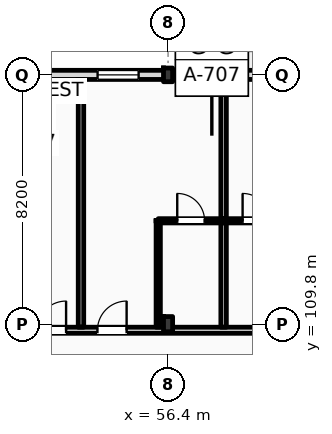
"""IFC4 building model, lengths in metres.
Left out: names, types, materials, properties, quantities, classifications, styles, units other than length and angle.
Written with IfcOpenShell. Run it as: python <this file> out.ifc"""

import sys

from ifc_helpers import new_model, si_unit, direction, frame, frame_2d, origin, origin_2d, place, context, subcontext, project, spatial, rectangle, i_section, extrude, element, fill, save


model = new_model("IFC4")
c1 = context("Model", 3, precision=1e-05, world=origin(), true_north=direction((0.0, 1.0)))
c2 = subcontext(c1, "Body", "Model", "MODEL_VIEW")
j1 = project(units=[si_unit("LENGTHUNIT", "METRE"), si_unit("PLANEANGLEUNIT", "RADIAN")], contexts=[c1])
p1 = place(None, origin())
s1 = spatial("IfcSite", under=j1, at=p1, CompositionType="ELEMENT")
p2 = place(p1, origin())
s2 = spatial("IfcBuilding", under=s1, at=p2, CompositionType="ELEMENT")
p3 = place(p2, frame((0.0, 0.0, 28.2)))
s3 = spatial("IfcBuildingStorey", under=s2, at=p3, CompositionType="ELEMENT", Elevation=28.2)
p4 = place(p3, frame((56.4, 109.8, 0.0), z_axis=(0.0, 0.0, 1.0), x_axis=(1.0, 0.0, 0.0)))
e1 = element("IfcColumn", 1, at=p4, inside=s3, PredefinedType="COLUMN", context=c2, shape_type="SweptSolid", body=[
    extrude(i_section(OverallWidth=0.3, OverallDepth=0.5, WebThickness=0.014, FlangeThickness=0.028, FilletRadius=0.027, at=origin_2d()), origin(), (0.0, 0.0, 1.0), 3.6),
])
p5 = place(p3, frame((56.4, 118.0, 0.0), z_axis=(0.0, 0.0, 1.0), x_axis=(1.0, 0.0, 0.0)))
e2 = element("IfcColumn", 2, at=p5, inside=s3, PredefinedType="COLUMN", context=c2, shape_type="SweptSolid", body=[
    extrude(i_section(OverallWidth=0.3, OverallDepth=0.45, WebThickness=0.014, FlangeThickness=0.026, FilletRadius=0.027, at=origin_2d()), origin(), (0.0, 0.0, 1.0), 3.6),
])
p6 = place(p3, frame((22.5, 118.0, 0.0), z_axis=(0.0, 0.0, 1.0), x_axis=(1.0, 0.0, 0.0)))
e3 = element("IfcWall", 3, at=p6, inside=s3, PredefinedType="STANDARD", context=c2, shape_type="SweptSolid", body=[
    extrude(rectangle(XDim=97.5, YDim=0.3, at=frame_2d((48.75, 0.0))), origin(), (0.0, 0.0, 1.0), 2.8),
])
p7 = place(p6, frame((0.91, 0.0, 0.9)))
e4 = element("IfcOpeningElement", 4, at=p7, cuts=e3, PredefinedType="OPENING", context=c2, shape_type="SweptSolid", body=[
    extrude(rectangle(XDim=0.9, YDim=1.72, at=frame_2d((0.45, 0.86))), frame((0.0, 0.16, 0.0), z_axis=(0.0, -1.0, 0.0), x_axis=(1.0, 0.0, 0.0)), (0.0, 0.0, 1.0), 0.32),
])
p8 = place(p6, frame((6.561, 0.0, 0.0)))
e5 = element("IfcOpeningElement", 5, at=p8, cuts=e3, PredefinedType="OPENING", context=c2, shape_type="SweptSolid", body=[
    extrude(rectangle(XDim=1.2, YDim=2.25, at=frame_2d((0.6, 1.125))), frame((0.0, 0.16, 0.0), z_axis=(0.0, -1.0, 0.0), x_axis=(1.0, 0.0, 0.0)), (0.0, 0.0, 1.0), 0.32),
])
p9 = place(p6, frame((11.477, 0.0, 0.9)))
e6 = element("IfcOpeningElement", 6, at=p9, cuts=e3, PredefinedType="OPENING", context=c2, shape_type="SweptSolid", body=[
    extrude(rectangle(XDim=1.1, YDim=1.5, at=frame_2d((0.55, 0.75))), frame((0.0, 0.16, 0.0), z_axis=(0.0, -1.0, 0.0), x_axis=(1.0, 0.0, 0.0)), (0.0, 0.0, 1.0), 0.32),
])
p10 = place(p6, frame((15.194, 0.0, 0.9)))
e7 = element("IfcOpeningElement", 7, at=p10, cuts=e3, PredefinedType="OPENING", context=c2, shape_type="SweptSolid", body=[
    extrude(rectangle(XDim=1.25, YDim=1.6, at=frame_2d((0.625, 0.8))), frame((0.0, 0.16, 0.0), z_axis=(0.0, -1.0, 0.0), x_axis=(1.0, 0.0, 0.0)), (0.0, 0.0, 1.0), 0.32),
])
p11 = place(p6, frame((19.509, 0.0, 0.9)))
e8 = element("IfcOpeningElement", 8, at=p11, cuts=e3, PredefinedType="OPENING", context=c2, shape_type="SweptSolid", body=[
    extrude(rectangle(XDim=1.4, YDim=1.7, at=frame_2d((0.7, 0.85))), frame((0.0, 0.16, 0.0), z_axis=(0.0, -1.0, 0.0), x_axis=(1.0, 0.0, 0.0)), (0.0, 0.0, 1.0), 0.32),
])
p12 = place(p6, frame((23.258, 0.0, 0.0)))
e9 = element("IfcOpeningElement", 9, at=p12, cuts=e3, PredefinedType="OPENING", context=c2, shape_type="SweptSolid", body=[
    extrude(rectangle(XDim=1.2, YDim=2.25, at=frame_2d((0.6, 1.125))), frame((0.0, 0.16, 0.0), z_axis=(0.0, -1.0, 0.0), x_axis=(1.0, 0.0, 0.0)), (0.0, 0.0, 1.0), 0.32),
])
p13 = place(p6, frame((28.115, 0.0, 0.9)))
e10 = element("IfcOpeningElement", 10, at=p13, cuts=e3, PredefinedType="OPENING", context=c2, shape_type="SweptSolid", body=[
    extrude(rectangle(XDim=1.75, YDim=1.72, at=frame_2d((0.875, 0.86))), frame((0.0, 0.16, 0.0), z_axis=(0.0, -1.0, 0.0), x_axis=(1.0, 0.0, 0.0)), (0.0, 0.0, 1.0), 0.32),
])
p14 = place(p6, frame((31.582, 0.0, 0.9)))
e11 = element("IfcOpeningElement", 11, at=p14, cuts=e3, PredefinedType="OPENING", context=c2, shape_type="SweptSolid", body=[
    extrude(rectangle(XDim=1.35, YDim=1.72, at=frame_2d((0.675, 0.86))), frame((0.0, 0.16, 0.0), z_axis=(0.0, -1.0, 0.0), x_axis=(1.0, 0.0, 0.0)), (0.0, 0.0, 1.0), 0.32),
])
p15 = place(p6, frame((37.379, 0.0, 0.0)))
e12 = element("IfcOpeningElement", 12, at=p15, cuts=e3, PredefinedType="OPENING", context=c2, shape_type="SweptSolid", body=[
    extrude(rectangle(XDim=1.2, YDim=2.25, at=frame_2d((0.6, 1.125))), frame((0.0, 0.16, 0.0), z_axis=(0.0, -1.0, 0.0), x_axis=(1.0, 0.0, 0.0)), (0.0, 0.0, 1.0), 0.32),
])
p16 = place(p6, frame((42.663, 0.0, 0.9)))
e13 = element("IfcOpeningElement", 13, at=p16, cuts=e3, PredefinedType="OPENING", context=c2, shape_type="SweptSolid", body=[
    extrude(rectangle(XDim=1.35, YDim=1.72, at=frame_2d((0.675, 0.86))), frame((0.0, 0.16, 0.0), z_axis=(0.0, -1.0, 0.0), x_axis=(1.0, 0.0, 0.0)), (0.0, 0.0, 1.0), 0.32),
])
p17 = place(p6, frame((45.119, 0.0, 0.9)))
e14 = element("IfcOpeningElement", 14, at=p17, cuts=e3, PredefinedType="OPENING", context=c2, shape_type="SweptSolid", body=[
    extrude(rectangle(XDim=2.871, YDim=1.72, at=frame_2d((1.436, 0.86))), frame((0.0, 0.16, 0.0), z_axis=(0.0, -1.0, 0.0), x_axis=(1.0, 0.0, 0.0)), (0.0, 0.0, 1.0), 0.32),
])
p18 = place(p6, frame((50.41, 0.0, 0.9)))
e15 = element("IfcOpeningElement", 15, at=p18, cuts=e3, PredefinedType="OPENING", context=c2, shape_type="SweptSolid", body=[
    extrude(rectangle(XDim=1.8, YDim=1.72, at=frame_2d((0.9, 0.86))), frame((0.0, 0.16, 0.0), z_axis=(0.0, -1.0, 0.0), x_axis=(1.0, 0.0, 0.0)), (0.0, 0.0, 1.0), 0.32),
])
p19 = place(p6, frame((54.375, 0.0, 0.0)))
e16 = element("IfcOpeningElement", 16, at=p19, cuts=e3, PredefinedType="OPENING", context=c2, shape_type="SweptSolid", body=[
    extrude(rectangle(XDim=1.2, YDim=2.25, at=frame_2d((0.6, 1.125))), frame((0.0, 0.16, 0.0), z_axis=(0.0, -1.0, 0.0), x_axis=(1.0, 0.0, 0.0)), (0.0, 0.0, 1.0), 0.32),
])
p20 = place(p6, frame((59.052, 0.0, 0.9)))
e17 = element("IfcOpeningElement", 17, at=p20, cuts=e3, PredefinedType="OPENING", context=c2, shape_type="SweptSolid", body=[
    extrude(rectangle(XDim=1.35, YDim=1.72, at=frame_2d((0.675, 0.86))), frame((0.0, 0.16, 0.0), z_axis=(0.0, -1.0, 0.0), x_axis=(1.0, 0.0, 0.0)), (0.0, 0.0, 1.0), 0.32),
])
p21 = place(p6, frame((62.768, 0.0, 0.9)))
e18 = element("IfcOpeningElement", 18, at=p21, cuts=e3, PredefinedType="OPENING", context=c2, shape_type="SweptSolid", body=[
    extrude(rectangle(XDim=1.5, YDim=1.72, at=frame_2d((0.75, 0.86))), frame((0.0, 0.16, 0.0), z_axis=(0.0, -1.0, 0.0), x_axis=(1.0, 0.0, 0.0)), (0.0, 0.0, 1.0), 0.32),
])
p22 = place(p6, frame((68.498, 0.0, 0.0)))
e19 = element("IfcOpeningElement", 19, at=p22, cuts=e3, PredefinedType="OPENING", context=c2, shape_type="SweptSolid", body=[
    extrude(rectangle(XDim=1.2, YDim=2.25, at=frame_2d((0.6, 1.125))), frame((0.0, 0.16, 0.0), z_axis=(0.0, -1.0, 0.0), x_axis=(1.0, 0.0, 0.0)), (0.0, 0.0, 1.0), 0.32),
])
p23 = place(p6, frame((71.265, 0.0, 0.9)))
e20 = element("IfcOpeningElement", 20, at=p23, cuts=e3, PredefinedType="OPENING", context=c2, shape_type="SweptSolid", body=[
    extrude(rectangle(XDim=0.9, YDim=1.72, at=frame_2d((0.45, 0.86))), frame((0.0, 0.16, 0.0), z_axis=(0.0, -1.0, 0.0), x_axis=(1.0, 0.0, 0.0)), (0.0, 0.0, 1.0), 0.32),
])
p24 = place(p6, frame((76.316, 0.0, 0.9)))
e21 = element("IfcOpeningElement", 21, at=p24, cuts=e3, PredefinedType="OPENING", context=c2, shape_type="SweptSolid", body=[
    extrude(rectangle(XDim=1.95, YDim=1.72, at=frame_2d((0.975, 0.86))), frame((0.0, 0.16, 0.0), z_axis=(0.0, -1.0, 0.0), x_axis=(1.0, 0.0, 0.0)), (0.0, 0.0, 1.0), 0.32),
])
p25 = place(p6, frame((81.632, 0.0, 0.9)))
e22 = element("IfcOpeningElement", 22, at=p25, cuts=e3, PredefinedType="OPENING", context=c2, shape_type="SweptSolid", body=[
    extrude(rectangle(XDim=1.35, YDim=1.72, at=frame_2d((0.675, 0.86))), frame((0.0, 0.16, 0.0), z_axis=(0.0, -1.0, 0.0), x_axis=(1.0, 0.0, 0.0)), (0.0, 0.0, 1.0), 0.32),
])
p26 = place(p6, frame((84.948, 0.0, 0.9)))
e23 = element("IfcOpeningElement", 23, at=p26, cuts=e3, PredefinedType="OPENING", context=c2, shape_type="SweptSolid", body=[
    extrude(rectangle(XDim=2.25, YDim=1.72, at=frame_2d((1.125, 0.86))), frame((0.0, 0.16, 0.0), z_axis=(0.0, -1.0, 0.0), x_axis=(1.0, 0.0, 0.0)), (0.0, 0.0, 1.0), 0.32),
])
p27 = place(p6, frame((90.063, 0.0, 0.9)))
e24 = element("IfcOpeningElement", 24, at=p27, cuts=e3, PredefinedType="OPENING", context=c2, shape_type="SweptSolid", body=[
    extrude(rectangle(XDim=1.8, YDim=1.72, at=frame_2d((0.9, 0.86))), frame((0.0, 0.16, 0.0), z_axis=(0.0, -1.0, 0.0), x_axis=(1.0, 0.0, 0.0)), (0.0, 0.0, 1.0), 0.32),
])
p28 = place(p6, frame((93.529, 0.0, 0.9)))
e25 = element("IfcOpeningElement", 25, at=p28, cuts=e3, PredefinedType="OPENING", context=c2, shape_type="SweptSolid", body=[
    extrude(rectangle(XDim=2.55, YDim=1.72, at=frame_2d((1.275, 0.86))), frame((0.0, 0.16, 0.0), z_axis=(0.0, -1.0, 0.0), x_axis=(1.0, 0.0, 0.0)), (0.0, 0.0, 1.0), 0.32),
])
p29 = place(p3, frame((10.65, 109.6, 0.0), z_axis=(0.0, 0.0, 1.0), x_axis=(1.0, 0.0, 0.0)))
e26 = element("IfcWall", 26, at=p29, inside=s3, PredefinedType="PARTITIONING", context=c2, shape_type="SweptSolid", body=[
    extrude(rectangle(XDim=109.21, YDim=0.2, at=frame_2d((54.605, 0.0))), origin(), (0.0, 0.0, 1.0), 2.8),
])
p30 = place(p29, frame((12.611, 0.0, 0.0)))
e27 = element("IfcOpeningElement", 27, at=p30, cuts=e26, PredefinedType="OPENING", context=c2, shape_type="SweptSolid", body=[
    extrude(rectangle(XDim=1.02, YDim=2.2, at=frame_2d((0.51, 1.1))), frame((0.0, 0.11, 0.0), z_axis=(0.0, -1.0, 0.0), x_axis=(1.0, 0.0, 0.0)), (0.0, 0.0, 1.0), 0.22),
])
p31 = place(p29, frame((19.451, 0.0, 0.0)))
e28 = element("IfcOpeningElement", 28, at=p31, cuts=e26, PredefinedType="OPENING", context=c2, shape_type="SweptSolid", body=[
    extrude(rectangle(XDim=1.02, YDim=2.2, at=frame_2d((0.51, 1.1))), frame((0.0, 0.11, 0.0), z_axis=(0.0, -1.0, 0.0), x_axis=(1.0, 0.0, 0.0)), (0.0, 0.0, 1.0), 0.22),
])
p32 = place(p29, frame((23.842, 0.0, 0.0)))
e29 = element("IfcOpeningElement", 29, at=p32, cuts=e26, PredefinedType="OPENING", context=c2, shape_type="SweptSolid", body=[
    extrude(rectangle(XDim=1.02, YDim=2.2, at=frame_2d((0.51, 1.1))), frame((0.0, 0.11, 0.0), z_axis=(0.0, -1.0, 0.0), x_axis=(1.0, 0.0, 0.0)), (0.0, 0.0, 1.0), 0.22),
])
p33 = place(p29, frame((26.084, 0.0, 0.0)))
e30 = element("IfcOpeningElement", 30, at=p33, cuts=e26, PredefinedType="OPENING", context=c2, shape_type="SweptSolid", body=[
    extrude(rectangle(XDim=1.02, YDim=2.2, at=frame_2d((0.51, 1.1))), frame((0.0, 0.11, 0.0), z_axis=(0.0, -1.0, 0.0), x_axis=(1.0, 0.0, 0.0)), (0.0, 0.0, 1.0), 0.22),
])
p34 = place(p29, frame((32.655, 0.0, 0.0)))
e31 = element("IfcOpeningElement", 31, at=p34, cuts=e26, PredefinedType="OPENING", context=c2, shape_type="SweptSolid", body=[
    extrude(rectangle(XDim=0.96, YDim=2.2, at=frame_2d((0.48, 1.1))), frame((0.0, 0.11, 0.0), z_axis=(0.0, -1.0, 0.0), x_axis=(1.0, 0.0, 0.0)), (0.0, 0.0, 1.0), 0.22),
])
p35 = place(p29, frame((34.895, 0.0, 0.0)))
e32 = element("IfcOpeningElement", 32, at=p35, cuts=e26, PredefinedType="OPENING", context=c2, shape_type="SweptSolid", body=[
    extrude(rectangle(XDim=0.96, YDim=2.2, at=frame_2d((0.48, 1.1))), frame((0.0, 0.11, 0.0), z_axis=(0.0, -1.0, 0.0), x_axis=(1.0, 0.0, 0.0)), (0.0, 0.0, 1.0), 0.22),
])
p36 = place(p29, frame((41.436, 0.0, 0.0)))
e33 = element("IfcOpeningElement", 33, at=p36, cuts=e26, PredefinedType="OPENING", context=c2, shape_type="SweptSolid", body=[
    extrude(rectangle(XDim=0.96, YDim=2.2, at=frame_2d((0.48, 1.1))), frame((0.0, 0.11, 0.0), z_axis=(0.0, -1.0, 0.0), x_axis=(1.0, 0.0, 0.0)), (0.0, 0.0, 1.0), 0.22),
])
p37 = place(p29, frame((43.427, 0.0, 0.0)))
e34 = element("IfcOpeningElement", 34, at=p37, cuts=e26, PredefinedType="OPENING", context=c2, shape_type="SweptSolid", body=[
    extrude(rectangle(XDim=0.96, YDim=2.2, at=frame_2d((0.48, 1.1))), frame((0.0, 0.11, 0.0), z_axis=(0.0, -1.0, 0.0), x_axis=(1.0, 0.0, 0.0)), (0.0, 0.0, 1.0), 0.22),
])
p38 = place(p29, frame((50.218, 0.0, 0.0)))
e35 = element("IfcOpeningElement", 35, at=p38, cuts=e26, PredefinedType="OPENING", context=c2, shape_type="SweptSolid", body=[
    extrude(rectangle(XDim=0.96, YDim=2.2, at=frame_2d((0.48, 1.1))), frame((0.0, 0.11, 0.0), z_axis=(0.0, -1.0, 0.0), x_axis=(1.0, 0.0, 0.0)), (0.0, 0.0, 1.0), 0.22),
])
p39 = place(p29, frame((54.859, 0.0, 0.0)))
e36 = element("IfcOpeningElement", 36, at=p39, cuts=e26, PredefinedType="OPENING", context=c2, shape_type="SweptSolid", body=[
    extrude(rectangle(XDim=0.96, YDim=2.2, at=frame_2d((0.48, 1.1))), frame((0.0, 0.11, 0.0), z_axis=(0.0, -1.0, 0.0), x_axis=(1.0, 0.0, 0.0)), (0.0, 0.0, 1.0), 0.22),
])
p40 = place(p29, frame((59.0, 0.0, 0.0)))
e37 = element("IfcOpeningElement", 37, at=p40, cuts=e26, PredefinedType="OPENING", context=c2, shape_type="SweptSolid", body=[
    extrude(rectangle(XDim=0.96, YDim=2.2, at=frame_2d((0.48, 1.1))), frame((0.0, 0.11, 0.0), z_axis=(0.0, -1.0, 0.0), x_axis=(1.0, 0.0, 0.0)), (0.0, 0.0, 1.0), 0.22),
])
p41 = place(p29, frame((63.39, 0.0, 0.0)))
e38 = element("IfcOpeningElement", 38, at=p41, cuts=e26, PredefinedType="OPENING", context=c2, shape_type="SweptSolid", body=[
    extrude(rectangle(XDim=0.96, YDim=2.2, at=frame_2d((0.48, 1.1))), frame((0.0, 0.11, 0.0), z_axis=(0.0, -1.0, 0.0), x_axis=(1.0, 0.0, 0.0)), (0.0, 0.0, 1.0), 0.22),
])
p42 = place(p29, frame((65.631, 0.0, 0.0)))
e39 = element("IfcOpeningElement", 39, at=p42, cuts=e26, PredefinedType="OPENING", context=c2, shape_type="SweptSolid", body=[
    extrude(rectangle(XDim=0.96, YDim=2.2, at=frame_2d((0.48, 1.1))), frame((0.0, 0.11, 0.0), z_axis=(0.0, -1.0, 0.0), x_axis=(1.0, 0.0, 0.0)), (0.0, 0.0, 1.0), 0.22),
])
p43 = place(p29, frame((72.172, 0.0, 0.0)))
e40 = element("IfcOpeningElement", 40, at=p43, cuts=e26, PredefinedType="OPENING", context=c2, shape_type="SweptSolid", body=[
    extrude(rectangle(XDim=0.96, YDim=2.2, at=frame_2d((0.48, 1.1))), frame((0.0, 0.11, 0.0), z_axis=(0.0, -1.0, 0.0), x_axis=(1.0, 0.0, 0.0)), (0.0, 0.0, 1.0), 0.22),
])
p44 = place(p29, frame((74.413, 0.0, 0.0)))
e41 = element("IfcOpeningElement", 41, at=p44, cuts=e26, PredefinedType="OPENING", context=c2, shape_type="SweptSolid", body=[
    extrude(rectangle(XDim=0.96, YDim=2.2, at=frame_2d((0.48, 1.1))), frame((0.0, 0.11, 0.0), z_axis=(0.0, -1.0, 0.0), x_axis=(1.0, 0.0, 0.0)), (0.0, 0.0, 1.0), 0.22),
])
p45 = place(p29, frame((80.954, 0.0, 0.0)))
e42 = element("IfcOpeningElement", 42, at=p45, cuts=e26, PredefinedType="OPENING", context=c2, shape_type="SweptSolid", body=[
    extrude(rectangle(XDim=0.96, YDim=2.2, at=frame_2d((0.48, 1.1))), frame((0.0, 0.11, 0.0), z_axis=(0.0, -1.0, 0.0), x_axis=(1.0, 0.0, 0.0)), (0.0, 0.0, 1.0), 0.22),
])
p46 = place(p29, frame((83.195, 0.0, 0.0)))
e43 = element("IfcOpeningElement", 43, at=p46, cuts=e26, PredefinedType="OPENING", context=c2, shape_type="SweptSolid", body=[
    extrude(rectangle(XDim=0.96, YDim=2.2, at=frame_2d((0.48, 1.1))), frame((0.0, 0.11, 0.0), z_axis=(0.0, -1.0, 0.0), x_axis=(1.0, 0.0, 0.0)), (0.0, 0.0, 1.0), 0.22),
])
p47 = place(p29, frame((89.735, 0.0, 0.0)))
e44 = element("IfcOpeningElement", 44, at=p47, cuts=e26, PredefinedType="OPENING", context=c2, shape_type="SweptSolid", body=[
    extrude(rectangle(XDim=0.96, YDim=2.2, at=frame_2d((0.48, 1.1))), frame((0.0, 0.11, 0.0), z_axis=(0.0, -1.0, 0.0), x_axis=(1.0, 0.0, 0.0)), (0.0, 0.0, 1.0), 0.22),
])
p48 = place(p29, frame((94.126, 0.0, 0.0)))
e45 = element("IfcOpeningElement", 45, at=p48, cuts=e26, PredefinedType="OPENING", context=c2, shape_type="SweptSolid", body=[
    extrude(rectangle(XDim=0.96, YDim=2.2, at=frame_2d((0.48, 1.1))), frame((0.0, 0.11, 0.0), z_axis=(0.0, -1.0, 0.0), x_axis=(1.0, 0.0, 0.0)), (0.0, 0.0, 1.0), 0.22),
])
p49 = place(p29, frame((98.517, 0.0, 0.0)))
e46 = element("IfcOpeningElement", 46, at=p49, cuts=e26, PredefinedType="OPENING", context=c2, shape_type="SweptSolid", body=[
    extrude(rectangle(XDim=0.96, YDim=2.2, at=frame_2d((0.48, 1.1))), frame((0.0, 0.11, 0.0), z_axis=(0.0, -1.0, 0.0), x_axis=(1.0, 0.0, 0.0)), (0.0, 0.0, 1.0), 0.22),
])
p50 = place(p29, frame((102.908, 0.0, 0.0)))
e47 = element("IfcOpeningElement", 47, at=p50, cuts=e26, PredefinedType="OPENING", context=c2, shape_type="SweptSolid", body=[
    extrude(rectangle(XDim=0.96, YDim=2.2, at=frame_2d((0.48, 1.1))), frame((0.0, 0.11, 0.0), z_axis=(0.0, -1.0, 0.0), x_axis=(1.0, 0.0, 0.0)), (0.0, 0.0, 1.0), 0.22),
])
p51 = place(p29, frame((105.099, 0.0, 0.0)))
e48 = element("IfcOpeningElement", 48, at=p51, cuts=e26, PredefinedType="OPENING", context=c2, shape_type="SweptSolid", body=[
    extrude(rectangle(XDim=0.96, YDim=2.2, at=frame_2d((0.48, 1.1))), frame((0.0, 0.11, 0.0), z_axis=(0.0, -1.0, 0.0), x_axis=(1.0, 0.0, 0.0)), (0.0, 0.0, 1.0), 0.22),
])
p52 = place(p29, frame((2.716, 0.0, 0.0)))
e49 = element("IfcOpeningElement", 49, at=p52, cuts=e26, PredefinedType="OPENING", context=c2, shape_type="SweptSolid", body=[
    extrude(rectangle(XDim=1.35, YDim=2.25, at=frame_2d((0.675, 1.125))), frame((0.0, 0.11, 0.0), z_axis=(0.0, -1.0, 0.0), x_axis=(1.0, 0.0, 0.0)), (0.0, 0.0, 1.0), 0.22),
])
p53 = place(p29, frame((6.65, 0.0, 0.0)))
e50 = element("IfcOpeningElement", 50, at=p53, cuts=e26, PredefinedType="OPENING", context=c2, shape_type="SweptSolid", body=[
    extrude(rectangle(XDim=1.35, YDim=2.25, at=frame_2d((0.675, 1.125))), frame((0.0, 0.11, 0.0), z_axis=(0.0, -1.0, 0.0), x_axis=(1.0, 0.0, 0.0)), (0.0, 0.0, 1.0), 0.22),
])
p54 = place(p29, frame((10.583, 0.0, 0.0)))
e51 = element("IfcOpeningElement", 51, at=p54, cuts=e26, PredefinedType="OPENING", context=c2, shape_type="SweptSolid", body=[
    extrude(rectangle(XDim=1.35, YDim=2.25, at=frame_2d((0.675, 1.125))), frame((0.0, 0.11, 0.0), z_axis=(0.0, -1.0, 0.0), x_axis=(1.0, 0.0, 0.0)), (0.0, 0.0, 1.0), 0.22),
])
for number, where, z_axis, x_axis in (
    (52, (53.536, 109.7, 0.0), (0.0, 0.0, 1.0), (0.0, 1.0, 0.0)),
    (53, (58.227, 109.7, 0.0), (0.0, 0.0, 1.0), (0.0, 1.0, 0.0)),
):
    element("IfcWall", number, at=place(p3, frame(where, z_axis=z_axis, x_axis=x_axis)), inside=s3, PredefinedType="PARTITIONING", context=c2, shape_type="SweptSolid", body=[
        extrude(rectangle(XDim=8.15, YDim=0.18, at=frame_2d((4.075, 0.0))), origin(), (0.0, 0.0, 1.0), 3.36),
    ])
p55 = place(p3, frame((56.077, 109.7, 0.0), z_axis=(0.0, 0.0, 1.0), x_axis=(0.0, 1.0, 0.0)))
e54 = element("IfcWall", 54, at=p55, inside=s3, PredefinedType="PARTITIONING", context=c2, shape_type="SweptSolid", body=[
    extrude(rectangle(XDim=3.5, YDim=0.14, at=frame_2d((1.75, 0.0))), origin(), (0.0, 0.0, 1.0), 3.36),
])
p56 = place(p3, frame((56.077, 113.2, 0.0), z_axis=(0.0, 0.0, 1.0), x_axis=(1.0, 0.0, 0.0)))
e55 = element("IfcWall", 55, at=p56, inside=s3, PredefinedType="PARTITIONING", context=c2, shape_type="SweptSolid", body=[
    extrude(rectangle(XDim=2.15, YDim=0.14, at=frame_2d((1.075, 0.0))), origin(), (0.0, 0.0, 1.0), 3.36),
])
p57 = place(p56, frame((0.625, 0.0, 0.0)))
e56 = element("IfcOpeningElement", 56, at=p57, cuts=e55, PredefinedType="OPENING", context=c2, shape_type="SweptSolid", body=[
    extrude(rectangle(XDim=0.9, YDim=2.1, at=frame_2d((0.45, 1.05))), frame((0.0, 0.08, 0.0), z_axis=(0.0, -1.0, 0.0), x_axis=(1.0, 0.0, 0.0)), (0.0, 0.0, 1.0), 0.16),
])
p58 = place(p3, frame((58.227, 113.2, 0.0), z_axis=(0.0, 0.0, 1.0), x_axis=(1.0, 0.0, 0.0)))
e57 = element("IfcWall", 57, at=p58, inside=s3, PredefinedType="PARTITIONING", context=c2, shape_type="SweptSolid", body=[
    extrude(rectangle(XDim=2.15, YDim=0.14, at=frame_2d((1.075, 0.0))), origin(), (0.0, 0.0, 1.0), 3.36),
])
p59 = place(p58, frame((0.625, 0.0, 0.0)))
e58 = element("IfcOpeningElement", 58, at=p59, cuts=e57, PredefinedType="OPENING", context=c2, shape_type="SweptSolid", body=[
    extrude(rectangle(XDim=0.9, YDim=2.1, at=frame_2d((0.45, 1.05))), frame((0.0, 0.08, 0.0), z_axis=(0.0, -1.0, 0.0), x_axis=(1.0, 0.0, 0.0)), (0.0, 0.0, 1.0), 0.16),
])
p60 = place(p14, origin())
e59 = element("IfcWindow", 59, at=p60, inside=s3, PartitioningType="DOUBLE_PANEL_VERTICAL", PredefinedType="WINDOW", context=c2, shape_type="SweptSolid", body=[
    extrude(rectangle(XDim=1.35, YDim=1.72, at=frame_2d((0.675, 0.86))), frame((0.0, 0.03, 0.0), z_axis=(0.0, -1.0, 0.0), x_axis=(1.0, 0.0, 0.0)), (0.0, 0.0, 1.0), 0.06),
])
fill(e11, e59)
p61 = place(p36, origin())
e60 = element("IfcDoor", 60, at=p61, inside=s3, OperationType="SINGLE_SWING_RIGHT", PredefinedType="DOOR", context=c2, shape_type="SweptSolid", body=[
    extrude(rectangle(XDim=0.96, YDim=2.2, at=frame_2d((0.48, 1.1))), frame((0.0, 0.025, 0.0), z_axis=(0.0, -1.0, 0.0), x_axis=(1.0, 0.0, 0.0)), (0.0, 0.0, 1.0), 0.05),
])
fill(e33, e60)
p62 = place(p37, origin())
e61 = element("IfcDoor", 61, at=p62, inside=s3, OperationType="SINGLE_SWING_RIGHT", PredefinedType="DOOR", context=c2, shape_type="SweptSolid", body=[
    extrude(rectangle(XDim=0.96, YDim=2.2, at=frame_2d((0.48, 1.1))), frame((0.0, 0.025, 0.0), z_axis=(0.0, -1.0, 0.0), x_axis=(1.0, 0.0, 0.0)), (0.0, 0.0, 1.0), 0.05),
])
fill(e34, e61)
p63 = place(p57, origin())
e62 = element("IfcDoor", 62, at=p63, inside=s3, OperationType="SINGLE_SWING_LEFT", PredefinedType="DOOR", context=c2, shape_type="SweptSolid", body=[
    extrude(rectangle(XDim=0.9, YDim=2.1, at=frame_2d((0.45, 1.05))), frame((0.0, 0.025, 0.0), z_axis=(0.0, -1.0, 0.0), x_axis=(1.0, 0.0, 0.0)), (0.0, 0.0, 1.0), 0.05),
])
fill(e56, e62)
p64 = place(p59, origin())
e63 = element("IfcDoor", 63, at=p64, inside=s3, OperationType="SINGLE_SWING_LEFT", PredefinedType="DOOR", context=c2, shape_type="SweptSolid", body=[
    extrude(rectangle(XDim=0.9, YDim=2.1, at=frame_2d((0.45, 1.05))), frame((0.0, 0.025, 0.0), z_axis=(0.0, -1.0, 0.0), x_axis=(1.0, 0.0, 0.0)), (0.0, 0.0, 1.0), 0.05),
])
fill(e58, e63)
save(model, sys.argv[1])
